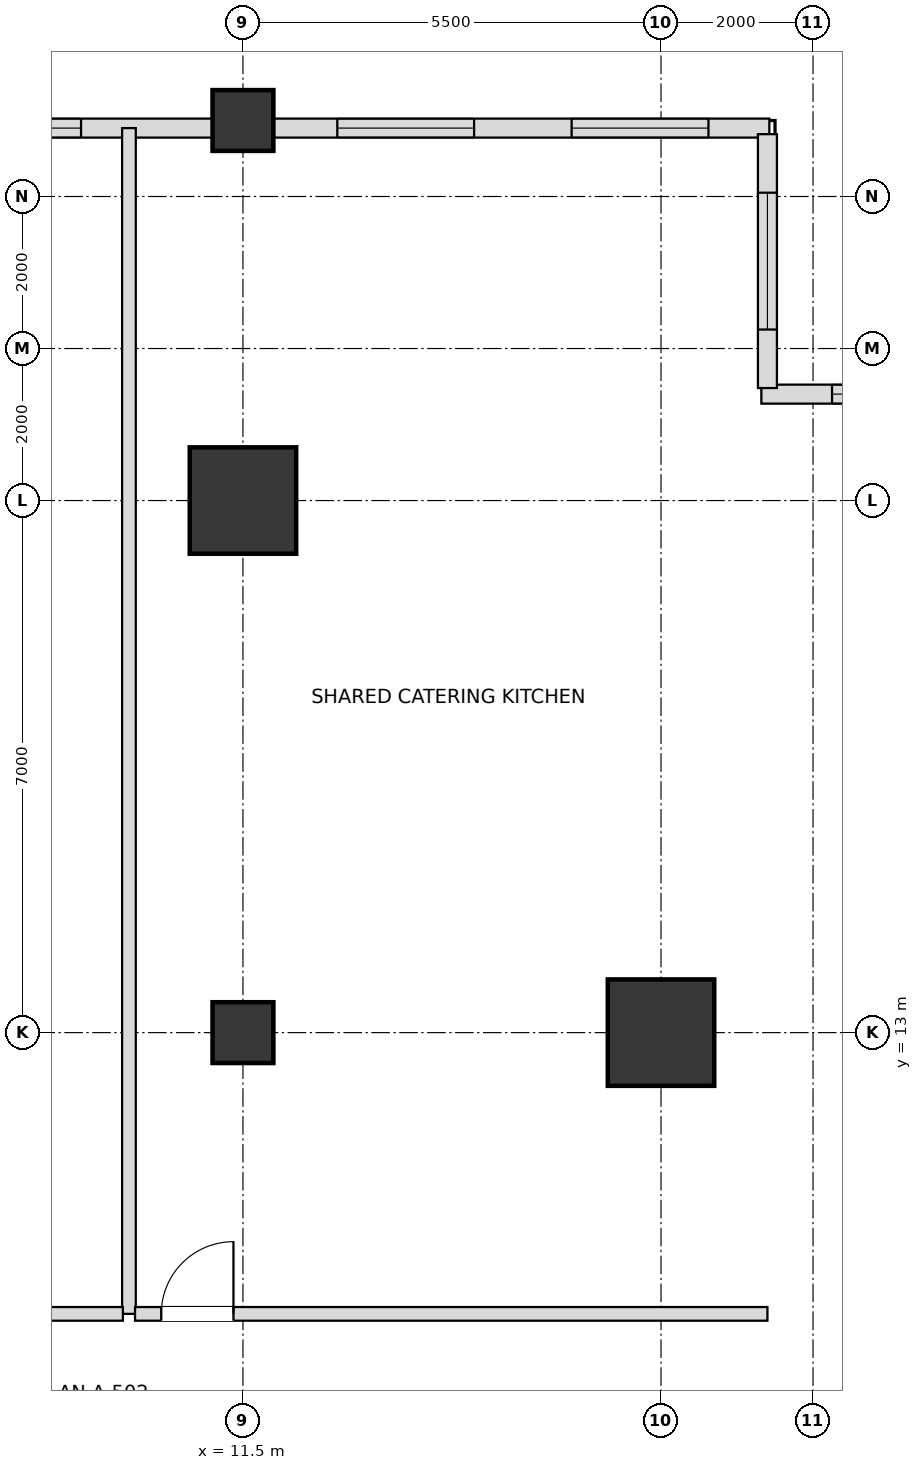
"""IFC4 building model, lengths in metres.
Left out: names, types, materials, properties, quantities, classifications, styles, units other than length and angle.
Written with IfcOpenShell. Run it as: python <this file> out.ifc"""

import sys

from ifc_helpers import new_model, si_unit, direction, frame, frame_2d, origin, origin_2d, place, context, subcontext, project, spatial, rectangle, extrude, element, fill, save


model = new_model("IFC4")
c1 = context("Model", 3, precision=1e-05, world=origin(), true_north=direction((0.0, 1.0)))
c2 = subcontext(c1, "Body", "Model", "MODEL_VIEW")
j1 = project(units=[si_unit("LENGTHUNIT", "METRE"), si_unit("PLANEANGLEUNIT", "RADIAN")], contexts=[c1])
p1 = place(None, origin())
s1 = spatial("IfcSite", under=j1, at=p1, CompositionType="ELEMENT")
p2 = place(p1, origin())
s2 = spatial("IfcBuilding", under=s1, at=p2, CompositionType="ELEMENT")
p3 = place(p2, frame((0.0, 0.0, 68.4)))
s3 = spatial("IfcBuildingStorey", under=s2, at=p3, CompositionType="ELEMENT", Elevation=68.4)
for number, where, z_axis, x_axis in (
    (1, (17.0, 13.0, 0.0), (0.0, 0.0, 1.0), (1.0, 0.0, 0.0)),
    (2, (11.5, 20.0, 0.0), (0.0, 0.0, 1.0), (1.0, 0.0, 0.0)),
):
    element("IfcColumn", number, at=place(p3, frame(where, z_axis=z_axis, x_axis=x_axis)), inside=s3, PredefinedType="USERDEFINED", context=c2, shape_type="SweptSolid", body=[
        extrude(rectangle(XDim=1.4, YDim=1.4, at=origin_2d()), origin(), (0.0, 0.0, 1.0), 3.6),
    ])
for number, where, z_axis, x_axis in (
    (3, (11.5, 13.0, 0.0), (0.0, 0.0, 1.0), (1.0, 0.0, 0.0)),
    (4, (11.5, 25.0, 0.0), (0.0, 0.0, 1.0), (1.0, 0.0, 0.0)),
):
    element("IfcColumn", number, at=place(p3, frame(where, z_axis=z_axis, x_axis=x_axis)), inside=s3, PredefinedType="COLUMN", context=c2, shape_type="SweptSolid", body=[
        extrude(rectangle(XDim=0.8, YDim=0.8, at=origin_2d()), origin(), (0.0, 0.0, 1.0), 3.6),
    ])
p4 = place(p3, frame((18.425, 24.9, 0.0), z_axis=(0.0, 0.0, 1.0), x_axis=(-1.0, 0.0, 0.0)))
e5 = element("IfcWall", 5, at=p4, inside=s3, PredefinedType="SOLIDWALL", context=c2, shape_type="SweptSolid", body=[
    extrude(rectangle(XDim=6.53, YDim=0.25, at=frame_2d((3.265, 0.0))), origin(), (0.0, 0.0, 1.0), 2.736),
])
p5 = place(p4, frame((0.801, 0.0, 0.72)))
e6 = element("IfcOpeningElement", 6, at=p5, cuts=e5, PredefinedType="OPENING", context=c2, shape_type="SweptSolid", body=[
    extrude(rectangle(XDim=1.8, YDim=1.68, at=frame_2d((0.9, 0.84))), frame((0.0, 0.135, 0.0), z_axis=(0.0, -1.0, 0.0), x_axis=(1.0, 0.0, 0.0)), (0.0, 0.0, 1.0), 0.27),
])
p6 = place(p4, frame((3.884, 0.0, 0.72)))
e7 = element("IfcOpeningElement", 7, at=p6, cuts=e5, PredefinedType="OPENING", context=c2, shape_type="SweptSolid", body=[
    extrude(rectangle(XDim=1.8, YDim=1.68, at=frame_2d((0.9, 0.84))), frame((0.0, 0.135, 0.0), z_axis=(0.0, -1.0, 0.0), x_axis=(1.0, 0.0, 0.0)), (0.0, 0.0, 1.0), 0.27),
])
p7 = place(p3, frame((11.105, 24.9, 0.0), z_axis=(0.0, 0.0, 1.0), x_axis=(-1.0, 0.0, 0.0)))
e8 = element("IfcWall", 8, at=p7, inside=s3, PredefinedType="SOLIDWALL", context=c2, shape_type="SweptSolid", body=[
    extrude(rectangle(XDim=4.21, YDim=0.25, at=frame_2d((2.105, 0.0))), origin(), (0.0, 0.0, 1.0), 2.736),
])
p8 = place(p7, frame((1.735, 0.0, 0.72)))
e9 = element("IfcOpeningElement", 9, at=p8, cuts=e8, PredefinedType="OPENING", context=c2, shape_type="SweptSolid", body=[
    extrude(rectangle(XDim=1.8, YDim=1.68, at=frame_2d((0.9, 0.84))), frame((0.0, 0.135, 0.0), z_axis=(0.0, -1.0, 0.0), x_axis=(1.0, 0.0, 0.0)), (0.0, 0.0, 1.0), 0.27),
])
p9 = place(p3, frame((21.98, 21.4, 0.0), z_axis=(0.0, 0.0, 1.0), x_axis=(-1.0, 0.0, 0.0)))
e10 = element("IfcWall", 10, at=p9, inside=s3, PredefinedType="SOLIDWALL", context=c2, shape_type="SweptSolid", body=[
    extrude(rectangle(XDim=3.66, YDim=0.25, at=frame_2d((1.83, 0.0))), origin(), (0.0, 0.0, 1.0), 2.736),
])
p10 = place(p9, frame((0.93, 0.0, 0.72)))
e11 = element("IfcOpeningElement", 11, at=p10, cuts=e10, PredefinedType="OPENING", context=c2, shape_type="SweptSolid", body=[
    extrude(rectangle(XDim=1.8, YDim=1.68, at=frame_2d((0.9, 0.84))), frame((0.0, 0.135, 0.0), z_axis=(0.0, -1.0, 0.0), x_axis=(1.0, 0.0, 0.0)), (0.0, 0.0, 1.0), 0.27),
])
p11 = place(p3, frame((18.4, 21.48, 0.0), z_axis=(0.0, 0.0, 1.0), x_axis=(0.0, 1.0, 0.0)))
e12 = element("IfcWall", 12, at=p11, inside=s3, PredefinedType="SOLIDWALL", context=c2, shape_type="SweptSolid", body=[
    extrude(rectangle(XDim=3.34, YDim=0.25, at=frame_2d((1.67, 0.0))), origin(), (0.0, 0.0, 1.0), 2.736),
])
p12 = place(p11, frame((0.77, 0.0, 0.72)))
e13 = element("IfcOpeningElement", 13, at=p12, cuts=e12, PredefinedType="OPENING", context=c2, shape_type="SweptSolid", body=[
    extrude(rectangle(XDim=1.8, YDim=1.68, at=frame_2d((0.9, 0.84))), frame((0.0, 0.135, 0.0), z_axis=(0.0, -1.0, 0.0), x_axis=(1.0, 0.0, 0.0)), (0.0, 0.0, 1.0), 0.27),
])
p13 = place(p3, frame((10.0, 9.3, 0.0), z_axis=(0.0, 0.0, 1.0), x_axis=(0.0, 1.0, 0.0)))
e14 = element("IfcWall", 14, at=p13, inside=s3, PredefinedType="PARTITIONING", context=c2, shape_type="SweptSolid", body=[
    extrude(rectangle(XDim=15.6, YDim=0.18, at=frame_2d((7.8, 0.0))), origin(), (0.0, 0.0, 1.0), 2.816),
])
p14 = place(p3, frame((-7.27, 9.3, 0.0), z_axis=(0.0, 0.0, 1.0), x_axis=(1.0, 0.0, 0.0)))
e15 = element("IfcWall", 15, at=p14, inside=s3, PredefinedType="PARTITIONING", context=c2, shape_type="SweptSolid", body=[
    extrude(rectangle(XDim=17.19, YDim=0.18, at=frame_2d((8.595, 0.0))), origin(), (0.0, 0.0, 1.0), 2.816),
])
p15 = place(p14, frame((8.115, 0.0, 0.0)))
e16 = element("IfcOpeningElement", 16, at=p15, cuts=e15, PredefinedType="OPENING", context=c2, shape_type="SweptSolid", body=[
    extrude(rectangle(XDim=0.95, YDim=2.15, at=frame_2d((0.475, 1.075))), frame((0.0, 0.1, 0.0), z_axis=(0.0, -1.0, 0.0), x_axis=(1.0, 0.0, 0.0)), (0.0, 0.0, 1.0), 0.2),
])
p16 = place(p3, frame((10.08, 9.3, 0.0), z_axis=(0.0, 0.0, 1.0), x_axis=(1.0, 0.0, 0.0)))
e17 = element("IfcWall", 17, at=p16, inside=s3, PredefinedType="PARTITIONING", context=c2, shape_type="SweptSolid", body=[
    extrude(rectangle(XDim=8.32, YDim=0.18, at=frame_2d((4.16, 0.0))), origin(), (0.0, 0.0, 1.0), 2.816),
])
p17 = place(p16, frame((0.345, 0.0, 0.0)))
e18 = element("IfcOpeningElement", 18, at=p17, cuts=e17, PredefinedType="OPENING", context=c2, shape_type="SweptSolid", body=[
    extrude(rectangle(XDim=0.95, YDim=2.15, at=frame_2d((0.475, 1.075))), frame((0.0, 0.1, 0.0), z_axis=(0.0, -1.0, 0.0), x_axis=(1.0, 0.0, 0.0)), (0.0, 0.0, 1.0), 0.2),
])
p18 = place(p5, origin())
e19 = element("IfcWindow", 19, at=p18, inside=s3, PartitioningType="SINGLE_PANEL", PredefinedType="WINDOW", context=c2, shape_type="SweptSolid", body=[
    extrude(rectangle(XDim=1.8, YDim=1.68, at=frame_2d((0.9, 0.84))), frame((0.0, 0.03, 0.0), z_axis=(0.0, -1.0, 0.0), x_axis=(1.0, 0.0, 0.0)), (0.0, 0.0, 1.0), 0.06),
])
fill(e6, e19)
p19 = place(p6, origin())
e20 = element("IfcWindow", 20, at=p19, inside=s3, PartitioningType="SINGLE_PANEL", PredefinedType="WINDOW", context=c2, shape_type="SweptSolid", body=[
    extrude(rectangle(XDim=1.8, YDim=1.68, at=frame_2d((0.9, 0.84))), frame((0.0, 0.03, 0.0), z_axis=(0.0, -1.0, 0.0), x_axis=(1.0, 0.0, 0.0)), (0.0, 0.0, 1.0), 0.06),
])
fill(e7, e20)
p20 = place(p8, origin())
e21 = element("IfcWindow", 21, at=p20, inside=s3, PartitioningType="SINGLE_PANEL", PredefinedType="WINDOW", context=c2, shape_type="SweptSolid", body=[
    extrude(rectangle(XDim=1.8, YDim=1.68, at=frame_2d((0.9, 0.84))), frame((0.0, 0.03, 0.0), z_axis=(0.0, -1.0, 0.0), x_axis=(1.0, 0.0, 0.0)), (0.0, 0.0, 1.0), 0.06),
])
fill(e9, e21)
p21 = place(p10, origin())
e22 = element("IfcWindow", 22, at=p21, inside=s3, PartitioningType="SINGLE_PANEL", PredefinedType="WINDOW", context=c2, shape_type="SweptSolid", body=[
    extrude(rectangle(XDim=1.8, YDim=1.68, at=frame_2d((0.9, 0.84))), frame((0.0, 0.03, 0.0), z_axis=(0.0, -1.0, 0.0), x_axis=(1.0, 0.0, 0.0)), (0.0, 0.0, 1.0), 0.06),
])
fill(e11, e22)
p22 = place(p12, origin())
e23 = element("IfcWindow", 23, at=p22, inside=s3, PartitioningType="SINGLE_PANEL", PredefinedType="WINDOW", context=c2, shape_type="SweptSolid", body=[
    extrude(rectangle(XDim=1.8, YDim=1.68, at=frame_2d((0.9, 0.84))), frame((0.0, 0.03, 0.0), z_axis=(0.0, -1.0, 0.0), x_axis=(1.0, 0.0, 0.0)), (0.0, 0.0, 1.0), 0.06),
])
fill(e13, e23)
p23 = place(p17, origin())
e24 = element("IfcDoor", 24, at=p23, inside=s3, OperationType="SINGLE_SWING_RIGHT", PredefinedType="DOOR", context=c2, shape_type="SweptSolid", body=[
    extrude(rectangle(XDim=0.95, YDim=2.15, at=frame_2d((0.475, 1.075))), frame((0.0, 0.025, 0.0), z_axis=(0.0, -1.0, 0.0), x_axis=(1.0, 0.0, 0.0)), (0.0, 0.0, 1.0), 0.05),
])
fill(e18, e24)
save(model, sys.argv[1])
